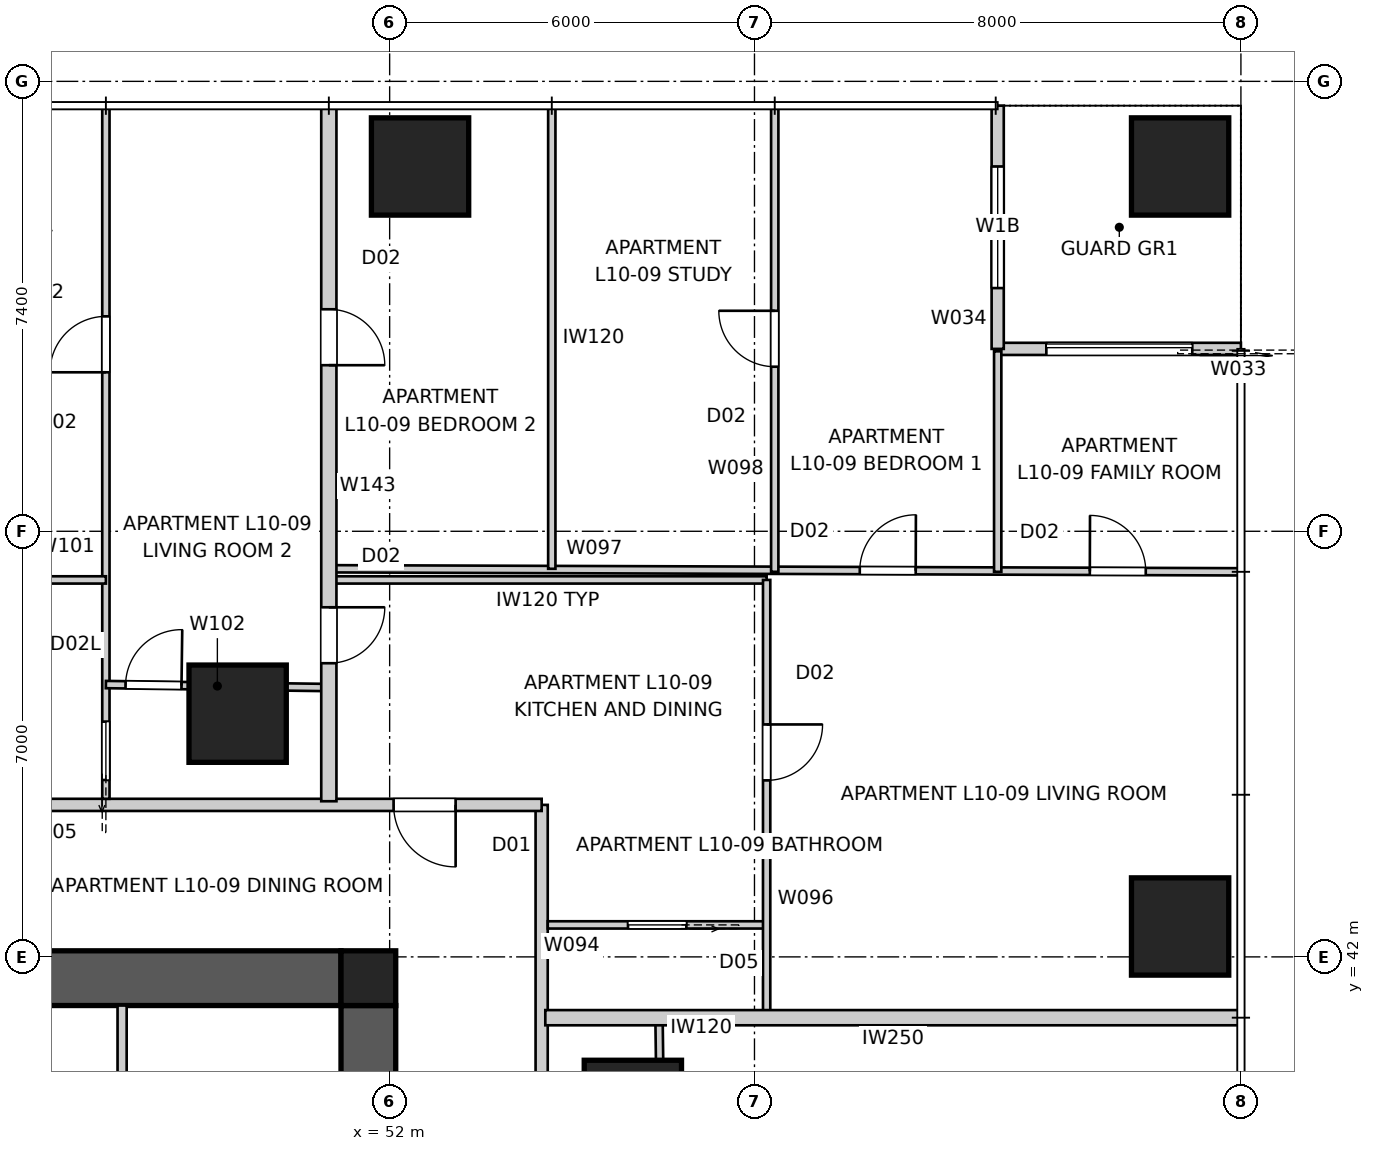
"""IFC4 building model, lengths in metres.
Left out: names, types, materials, properties, quantities, classifications, styles, units other than length and angle.
Written with IfcOpenShell. Run it as: python <this file> out.ifc"""

import sys

from ifc_helpers import new_model, si_unit, direction, frame, frame_2d, origin, origin_2d, place, context, subcontext, project, spatial, polyline, rectangle, outline, extrude, element, fill, save


model = new_model("IFC4")
c1 = context("Model", 3, precision=1e-05, world=origin(), true_north=direction((0.0, 1.0)))
c2 = subcontext(c1, "Body", "Model", "MODEL_VIEW")
j1 = project(units=[si_unit("LENGTHUNIT", "METRE"), si_unit("PLANEANGLEUNIT", "RADIAN")], contexts=[c1])
p1 = place(None, origin())
s1 = spatial("IfcSite", under=j1, at=p1, CompositionType="ELEMENT")
p2 = place(p1, origin())
s2 = spatial("IfcBuilding", under=s1, at=p2, CompositionType="ELEMENT")
p3 = place(p2, frame((0.0, 0.0, 38.8)))
s3 = spatial("IfcBuildingStorey", under=s2, at=p3, CompositionType="ELEMENT", Elevation=38.8)
p4 = place(p3, frame((28.8, 41.65, 0.0), z_axis=(0.0, 0.0, 1.0), x_axis=(1.0, 0.0, 0.0)))
e1 = element("IfcWall", 1, at=p4, inside=s3, PredefinedType="SHEAR", context=c2, shape_type="SweptSolid", body=[
    extrude(outline(polyline([(0.0, -0.45), (22.4, -0.45), (22.4, -0.025), (22.85, -0.025), (22.85, 0.025), (22.4, 0.025), (22.4, 0.45), (0.0, 0.45), (0.0, 0.025), (-0.45, 0.025), (-0.45, -0.025), (0.0, -0.025), (0.0, -0.45)])), origin(), (0.0, 0.0, 1.0), 3.4),
])
p5 = place(p3, frame((51.65, 18.8, 0.0), z_axis=(0.0, 0.0, 1.0), x_axis=(0.0, 1.0, 0.0)))
e2 = element("IfcWall", 2, at=p5, inside=s3, PredefinedType="SHEAR", context=c2, shape_type="SweptSolid", body=[
    extrude(outline(polyline([(0.0, -0.45), (22.4, -0.45), (22.4, -0.025), (22.85, -0.025), (22.85, 0.025), (22.4, 0.025), (22.4, 0.45), (0.0, 0.45), (0.0, 0.025), (-0.45, 0.025), (-0.45, -0.025), (0.0, -0.025), (0.0, -0.45)])), origin(), (0.0, 0.0, 1.0), 3.4),
])
p6 = place(p5, frame((11.14, 0.0, 0.0)))
e3 = element("IfcOpeningElement", 3, at=p6, cuts=e2, PredefinedType="OPENING", context=c2, shape_type="SweptSolid", body=[
    extrude(rectangle(XDim=1.02, YDim=2.4, at=frame_2d((0.51, 1.2))), frame((0.0, 0.46, 0.0), z_axis=(0.0, -1.0, 0.0), x_axis=(1.0, 0.0, 0.0)), (0.0, 0.0, 1.0), 0.92),
])
p7 = place(p3, frame((51.65, 41.65, 0.0), z_axis=(0.0, 0.0, 1.0), x_axis=(1.0, 0.0, 0.0)))
e4 = element("IfcColumn", 4, at=p7, inside=s3, PredefinedType="COLUMN", context=c2, shape_type="SweptSolid", body=[
    extrude(rectangle(XDim=0.9, YDim=0.9, at=origin_2d()), origin(), (0.0, 0.0, 1.0), 3.4),
])
for number, where, z_axis, x_axis in (
    (5, (65.0, 42.5, 0.0), (0.0, 0.0, 1.0), (1.0, 0.0, 0.0)),
    (6, (65.0, 55.0, 0.0), (0.0, 0.0, 1.0), (1.0, 0.0, 0.0)),
    (7, (52.5, 55.0, 0.0), (0.0, 0.0, 1.0), (1.0, 0.0, 0.0)),
):
    element("IfcColumn", number, at=place(p3, frame(where, z_axis=z_axis, x_axis=x_axis)), inside=s3, PredefinedType="COLUMN", context=c2, shape_type="SweptSolid", body=[
        extrude(rectangle(XDim=1.6, YDim=1.6, at=origin_2d()), origin(), (0.0, 0.0, 1.0), 3.2),
    ])
for number, where, z_axis, x_axis in (
    (8, (56.0, 39.5, 0.0), (0.0, 0.0, 1.0), (1.0, 0.0, 0.0)),
    (9, (49.5, 46.0, 0.0), (0.0, 0.0, 1.0), (1.0, 0.0, 0.0)),
):
    element("IfcColumn", number, at=place(p3, frame(where, z_axis=z_axis, x_axis=x_axis)), inside=s3, PredefinedType="COLUMN", context=c2, shape_type="SweptSolid", body=[
        extrude(rectangle(XDim=1.6, YDim=1.6, at=origin_2d()), origin(), (0.0, 0.0, 1.0), 3.4),
    ])
p8 = place(p3, frame((66.0, 52.0, 0.0), z_axis=(0.0, 0.0, 1.0), x_axis=(-1.0, 0.0, 0.0)))
e10 = element("IfcWall", 10, at=p8, inside=s3, PredefinedType="SOLIDWALL", context=c2, shape_type="SweptSolid", body=[
    extrude(rectangle(XDim=4.0, YDim=0.2, at=frame_2d((2.0, 0.0))), origin(), (0.0, 0.0, 1.0), 3.2),
])
p9 = place(p8, frame((0.8, 0.0, 0.0)))
e11 = element("IfcOpeningElement", 11, at=p9, cuts=e10, PredefinedType="OPENING", context=c2, shape_type="SweptSolid", body=[
    extrude(rectangle(XDim=2.4, YDim=2.1, at=frame_2d((1.2, 1.05))), frame((0.0, 0.11, 0.0), z_axis=(0.0, -1.0, 0.0), x_axis=(1.0, 0.0, 0.0)), (0.0, 0.0, 1.0), 0.22),
])
p10 = place(p3, frame((62.0, 52.0, 0.0), z_axis=(0.0, 0.0, 1.0), x_axis=(0.0, 1.0, 0.0)))
e12 = element("IfcWall", 12, at=p10, inside=s3, PredefinedType="SOLIDWALL", context=c2, shape_type="SweptSolid", body=[
    extrude(rectangle(XDim=4.0, YDim=0.2, at=frame_2d((2.0, 0.0))), origin(), (0.0, 0.0, 1.0), 3.2),
])
p11 = place(p10, frame((1.0, 0.0, 0.4)))
e13 = element("IfcOpeningElement", 13, at=p11, cuts=e12, PredefinedType="OPENING", context=c2, shape_type="SweptSolid", body=[
    extrude(rectangle(XDim=2.0, YDim=1.8, at=frame_2d((1.0, 0.9))), frame((0.0, 0.11, 0.0), z_axis=(0.0, -1.0, 0.0), x_axis=(1.0, 0.0, 0.0)), (0.0, 0.0, 1.0), 0.22),
])
p12 = place(p3, frame((54.5, 16.3, 0.0), z_axis=(0.0, 0.0, 1.0), x_axis=(0.0, 1.0, 0.0)))
e14 = element("IfcWall", 14, at=p12, inside=s3, PredefinedType="PARTITIONING", context=c2, shape_type="SweptSolid", body=[
    extrude(rectangle(XDim=28.2, YDim=0.2, at=frame_2d((14.1, 0.0))), origin(), (0.0, 0.0, 1.0), 3.2),
])
p13 = place(p12, frame((7.277, 0.0, 0.0)))
e15 = element("IfcOpeningElement", 15, at=p13, cuts=e14, PredefinedType="OPENING", context=c2, shape_type="SweptSolid", body=[
    extrude(rectangle(XDim=1.02, YDim=2.34, at=frame_2d((0.51, 1.17))), frame((0.0, 0.11, 0.0), z_axis=(0.0, -1.0, 0.0), x_axis=(1.0, 0.0, 0.0)), (0.0, 0.0, 1.0), 0.22),
])
p14 = place(p12, frame((15.16, 0.0, 0.0)))
e16 = element("IfcOpeningElement", 16, at=p14, cuts=e14, PredefinedType="OPENING", context=c2, shape_type="SweptSolid", body=[
    extrude(rectangle(XDim=1.02, YDim=2.34, at=frame_2d((0.51, 1.17))), frame((0.0, 0.11, 0.0), z_axis=(0.0, -1.0, 0.0), x_axis=(1.0, 0.0, 0.0)), (0.0, 0.0, 1.0), 0.22),
])
p15 = place(p3, frame((54.5, 44.5, 0.0), z_axis=(0.0, 0.0, 1.0), x_axis=(-1.0, 0.0, 0.0)))
e17 = element("IfcWall", 17, at=p15, inside=s3, PredefinedType="PARTITIONING", context=c2, shape_type="SweptSolid", body=[
    extrude(rectangle(XDim=28.2, YDim=0.2, at=frame_2d((14.1, 0.0))), origin(), (0.0, 0.0, 1.0), 3.2),
])
p16 = place(p15, frame((19.853, 0.0, 0.0)))
e18 = element("IfcOpeningElement", 18, at=p16, cuts=e17, PredefinedType="OPENING", context=c2, shape_type="SweptSolid", body=[
    extrude(rectangle(XDim=1.02, YDim=2.34, at=frame_2d((0.51, 1.17))), frame((0.0, 0.11, 0.0), z_axis=(0.0, -1.0, 0.0), x_axis=(1.0, 0.0, 0.0)), (0.0, 0.0, 1.0), 0.22),
])
p17 = place(p15, frame((1.415, 0.0, 0.0)))
e19 = element("IfcOpeningElement", 19, at=p17, cuts=e17, PredefinedType="OPENING", context=c2, shape_type="SweptSolid", body=[
    extrude(rectangle(XDim=1.02, YDim=2.34, at=frame_2d((0.51, 1.17))), frame((0.0, 0.11, 0.0), z_axis=(0.0, -1.0, 0.0), x_axis=(1.0, 0.0, 0.0)), (0.0, 0.0, 1.0), 0.22),
])
p18 = place(p3, frame((66.0, 41.0, 0.0), z_axis=(0.0, 0.0, 1.0), x_axis=(-1.0, 0.0, 0.0)))
e20 = element("IfcWall", 20, at=p18, inside=s3, PredefinedType="PARTITIONING", context=c2, shape_type="SweptSolid", body=[
    extrude(rectangle(XDim=11.44, YDim=0.25, at=frame_2d((5.72, 0.0))), origin(), (0.0, 0.0, 1.0), 3.2),
])
p19 = place(p3, frame((51.0, 56.0, 0.0), z_axis=(0.0, 0.0, 1.0), x_axis=(0.0, -1.0, 0.0)))
e21 = element("IfcWall", 21, at=p19, inside=s3, PredefinedType="PARTITIONING", context=c2, shape_type="SweptSolid", body=[
    extrude(rectangle(XDim=11.44, YDim=0.25, at=frame_2d((5.72, 0.0))), origin(), (0.0, 0.0, 1.0), 3.2),
])
p20 = place(p19, frame((8.25, 0.0, 0.0)))
e22 = element("IfcOpeningElement", 22, at=p20, cuts=e21, PredefinedType="OPENING", context=c2, shape_type="SweptSolid", body=[
    extrude(rectangle(XDim=0.92, YDim=2.34, at=frame_2d((0.46, 1.17))), frame((0.0, 0.135, 0.0), z_axis=(0.0, -1.0, 0.0), x_axis=(1.0, 0.0, 0.0)), (0.0, 0.0, 1.0), 0.27),
])
p21 = place(p19, frame((3.348, 0.0, 0.0)))
e23 = element("IfcOpeningElement", 23, at=p21, cuts=e21, PredefinedType="OPENING", context=c2, shape_type="SweptSolid", body=[
    extrude(rectangle(XDim=0.92, YDim=2.34, at=frame_2d((0.46, 1.17))), frame((0.0, 0.135, 0.0), z_axis=(0.0, -1.0, 0.0), x_axis=(1.0, 0.0, 0.0)), (0.0, 0.0, 1.0), 0.27),
])
p22 = place(p3, frame((47.6, 41.2, 0.0), z_axis=(0.0, 0.0, 1.0), x_axis=(0.0, -1.0, 0.0)))
e24 = element("IfcWall", 24, at=p22, inside=s3, PredefinedType="SOLIDWALL", context=c2, shape_type="SweptSolid", body=[
    extrude(rectangle(XDim=5.9, YDim=0.15, at=frame_2d((2.95, 0.0))), origin(), (0.0, 0.0, 1.0), 3.2),
])
p23 = place(p3, frame((56.43, 41.0, 0.0), z_axis=(0.0, 0.0, 1.0), x_axis=(0.013381849808, -0.999910459039, 0.0)))
e25 = element("IfcWall", 25, at=p23, inside=s3, PredefinedType="PARTITIONING", context=c2, shape_type="SweptSolid", body=[
    extrude(rectangle(XDim=3.667, YDim=0.12, at=frame_2d((1.833, 0.0))), origin(), (0.0, 0.0, 1.0), 2.2),
])
p24 = place(p3, frame((58.2, 42.526, 0.0), z_axis=(0.0, 0.0, 1.0), x_axis=(-1.0, 0.0, 0.0)))
e26 = element("IfcWall", 26, at=p24, inside=s3, PredefinedType="PARTITIONING", context=c2, shape_type="SweptSolid", body=[
    extrude(rectangle(XDim=3.6, YDim=0.12, at=frame_2d((1.8, 0.0))), origin(), (0.0, 0.0, 1.0), 3.2),
])
p25 = place(p24, frame((1.32, 0.0, 0.0)))
e27 = element("IfcOpeningElement", 27, at=p25, cuts=e26, PredefinedType="OPENING", context=c2, shape_type="SweptSolid", body=[
    extrude(rectangle(XDim=0.96, YDim=2.1, at=frame_2d((0.48, 1.05))), frame((0.0, 0.07, 0.0), z_axis=(0.0, -1.0, 0.0), x_axis=(1.0, 0.0, 0.0)), (0.0, 0.0, 1.0), 0.14),
])
p26 = place(p3, frame((51.0, 48.2, 0.0), z_axis=(0.0, 0.0, 1.0), x_axis=(1.0, 0.0, 0.0)))
e28 = element("IfcWall", 28, at=p26, inside=s3, PredefinedType="PARTITIONING", context=c2, shape_type="SweptSolid", body=[
    extrude(rectangle(XDim=7.2, YDim=0.12, at=frame_2d((3.6, 0.0))), origin(), (0.0, 0.0, 1.0), 3.2),
])
p27 = place(p3, frame((58.2, 48.2, 0.0), z_axis=(0.0, 0.0, 1.0), x_axis=(0.0, -1.0, 0.0)))
e29 = element("IfcWall", 29, at=p27, inside=s3, PredefinedType="PARTITIONING", context=c2, shape_type="SweptSolid", body=[
    extrude(rectangle(XDim=7.2, YDim=0.12, at=frame_2d((3.6, 0.0))), origin(), (0.0, 0.0, 1.0), 3.2),
])
p28 = place(p27, frame((2.377, 0.0, 0.0)))
e30 = element("IfcOpeningElement", 30, at=p28, cuts=e29, PredefinedType="OPENING", context=c2, shape_type="SweptSolid", body=[
    extrude(rectangle(XDim=0.92, YDim=2.34, at=frame_2d((0.46, 1.17))), frame((0.0, 0.07, 0.0), z_axis=(0.0, -1.0, 0.0), x_axis=(1.0, 0.0, 0.0)), (0.0, 0.0, 1.0), 0.14),
])
p29 = place(p3, frame((51.0, 48.383, 0.0), z_axis=(0.0, 0.0, 1.0), x_axis=(0.9999944038, -0.003345499915, 0.0)))
e31 = element("IfcWall", 31, at=p29, inside=s3, PredefinedType="PARTITIONING", context=c2, shape_type="SweptSolid", body=[
    extrude(rectangle(XDim=14.96, YDim=0.12, at=frame_2d((7.48, 0.0))), origin(), (0.0, 0.0, 1.0), 3.2),
])
p30 = place(p29, frame((12.515, 0.0, 0.0)))
e32 = element("IfcOpeningElement", 32, at=p30, cuts=e31, PredefinedType="OPENING", context=c2, shape_type="SweptSolid", body=[
    extrude(rectangle(XDim=0.92, YDim=2.34, at=frame_2d((0.46, 1.17))), frame((0.0, 0.07, 0.0), z_axis=(0.0, -1.0, 0.0), x_axis=(1.0, 0.0, 0.0)), (0.0, 0.0, 1.0), 0.14),
])
p31 = place(p29, frame((8.732, 0.0, 0.0)))
e33 = element("IfcOpeningElement", 33, at=p31, cuts=e31, PredefinedType="OPENING", context=c2, shape_type="SweptSolid", body=[
    extrude(rectangle(XDim=0.92, YDim=2.34, at=frame_2d((0.46, 1.17))), frame((0.0, 0.07, 0.0), z_axis=(0.0, -1.0, 0.0), x_axis=(1.0, 0.0, 0.0)), (0.0, 0.0, 1.0), 0.14),
])
p32 = place(p3, frame((58.333, 48.333, 0.0), z_axis=(0.0, 0.0, 1.0), x_axis=(0.0, 1.0, 0.0)))
e34 = element("IfcWall", 34, at=p32, inside=s3, PredefinedType="PARTITIONING", context=c2, shape_type="SweptSolid", body=[
    extrude(rectangle(XDim=7.627, YDim=0.12, at=frame_2d((3.813, 0.0))), origin(), (0.0, 0.0, 1.0), 3.2),
])
p33 = place(p32, frame((3.373, 0.0, 0.0)))
e35 = element("IfcOpeningElement", 35, at=p33, cuts=e34, PredefinedType="OPENING", context=c2, shape_type="SweptSolid", body=[
    extrude(rectangle(XDim=0.92, YDim=2.34, at=frame_2d((0.46, 1.17))), frame((0.0, 0.07, 0.0), z_axis=(0.0, -1.0, 0.0), x_axis=(1.0, 0.0, 0.0)), (0.0, 0.0, 1.0), 0.14),
])
p34 = place(p3, frame((62.0, 51.96, 0.0), z_axis=(0.0, 0.0, 1.0), x_axis=(0.0, -1.0, 0.0)))
e36 = element("IfcWall", 36, at=p34, inside=s3, PredefinedType="PARTITIONING", context=c2, shape_type="SweptSolid", body=[
    extrude(rectangle(XDim=3.627, YDim=0.12, at=frame_2d((1.813, 0.0))), origin(), (0.0, 0.0, 1.0), 3.2),
])
p35 = place(p3, frame((54.667, 55.96, 0.0), z_axis=(0.0, 0.0, 1.0), x_axis=(0.0, -1.0, 0.0)))
e37 = element("IfcWall", 37, at=p35, inside=s3, PredefinedType="PARTITIONING", context=c2, shape_type="SweptSolid", body=[
    extrude(rectangle(XDim=7.577, YDim=0.12, at=frame_2d((3.788, 0.0))), origin(), (0.0, 0.0, 1.0), 2.4),
])
p36 = place(p3, frame((47.333, 44.6, 0.0), z_axis=(0.0, 0.0, 1.0), x_axis=(0.0, 1.0, 0.0)))
e38 = element("IfcWall", 38, at=p36, inside=s3, PredefinedType="PARTITIONING", context=c2, shape_type="SweptSolid", body=[
    extrude(rectangle(XDim=11.36, YDim=0.12, at=frame_2d((5.68, 0.0))), origin(), (0.0, 0.0, 1.0), 3.2),
])
p37 = place(p36, frame((7.015, 0.0, 0.0)))
e39 = element("IfcOpeningElement", 39, at=p37, cuts=e38, PredefinedType="OPENING", context=c2, shape_type="SweptSolid", body=[
    extrude(rectangle(XDim=0.92, YDim=2.34, at=frame_2d((0.46, 1.17))), frame((0.0, 0.07, 0.0), z_axis=(0.0, -1.0, 0.0), x_axis=(1.0, 0.0, 0.0)), (0.0, 0.0, 1.0), 0.14),
])
p38 = place(p36, frame((0.31, 0.0, 0.0)))
e40 = element("IfcOpeningElement", 40, at=p38, cuts=e38, PredefinedType="OPENING", context=c2, shape_type="SweptSolid", body=[
    extrude(rectangle(XDim=0.96, YDim=2.1, at=frame_2d((0.48, 1.05))), frame((0.0, 0.07, 0.0), z_axis=(0.0, -1.0, 0.0), x_axis=(1.0, 0.0, 0.0)), (0.0, 0.0, 1.0), 0.14),
])
p39 = place(p3, frame((47.333, 46.479, 0.0), z_axis=(0.0, 0.0, 1.0), x_axis=(0.999910459039, -0.013381849808, 0.0)))
e41 = element("IfcWall", 41, at=p39, inside=s3, PredefinedType="PARTITIONING", context=c2, shape_type="SweptSolid", body=[
    extrude(rectangle(XDim=3.667, YDim=0.12, at=frame_2d((1.833, 0.0))), origin(), (0.0, 0.0, 1.0), 2.2),
])
p40 = place(p39, frame((0.323, 0.0, 0.0)))
e42 = element("IfcOpeningElement", 42, at=p40, cuts=e41, PredefinedType="OPENING", context=c2, shape_type="SweptSolid", body=[
    extrude(rectangle(XDim=0.92, YDim=2.1, at=frame_2d((0.46, 1.05))), frame((0.0, 0.07, 0.0), z_axis=(0.0, -1.0, 0.0), x_axis=(1.0, 0.0, 0.0)), (0.0, 0.0, 1.0), 0.14),
])
p41 = place(p3, frame((37.708, 48.2, 0.0), z_axis=(0.0, 0.0, 1.0), x_axis=(1.0, 0.0, 0.0)))
e43 = element("IfcWall", 43, at=p41, inside=s3, PredefinedType="PARTITIONING", context=c2, shape_type="SweptSolid", body=[
    extrude(rectangle(XDim=9.625, YDim=0.12, at=frame_2d((4.812, 0.0))), origin(), (0.0, 0.0, 1.0), 3.2),
])
p42 = place(p41, frame((0.666, 0.0, 0.0)))
e44 = element("IfcOpeningElement", 44, at=p42, cuts=e43, PredefinedType="OPENING", context=c2, shape_type="SweptSolid", body=[
    extrude(rectangle(XDim=0.96, YDim=2.1, at=frame_2d((0.48, 1.05))), frame((0.0, 0.07, 0.0), z_axis=(0.0, -1.0, 0.0), x_axis=(1.0, 0.0, 0.0)), (0.0, 0.0, 1.0), 0.14),
])
p43 = place(p41, frame((3.67, 0.0, 0.0)))
e45 = element("IfcOpeningElement", 45, at=p43, cuts=e43, PredefinedType="OPENING", context=c2, shape_type="SweptSolid", body=[
    extrude(rectangle(XDim=0.96, YDim=2.1, at=frame_2d((0.48, 1.05))), frame((0.0, 0.07, 0.0), z_axis=(0.0, -1.0, 0.0), x_axis=(1.0, 0.0, 0.0)), (0.0, 0.0, 1.0), 0.14),
])
p44 = place(p9, origin())
e46 = element("IfcDoor", 46, at=p44, inside=s3, OperationType="SLIDING_TO_LEFT", PredefinedType="DOOR", context=c2, shape_type="SweptSolid", body=[
    extrude(rectangle(XDim=2.4, YDim=2.1, at=frame_2d((1.2, 1.05))), frame((0.0, 0.025, 0.0), z_axis=(0.0, -1.0, 0.0), x_axis=(1.0, 0.0, 0.0)), (0.0, 0.0, 1.0), 0.05),
])
fill(e11, e46)
p45 = place(p11, origin())
e47 = element("IfcWindow", 47, at=p45, inside=s3, PartitioningType="SINGLE_PANEL", PredefinedType="WINDOW", context=c2, shape_type="SweptSolid", body=[
    extrude(rectangle(XDim=2.0, YDim=1.8, at=frame_2d((1.0, 0.9))), frame((0.0, 0.03, 0.0), z_axis=(0.0, -1.0, 0.0), x_axis=(1.0, 0.0, 0.0)), (0.0, 0.0, 1.0), 0.06),
])
fill(e13, e47)
p46 = place(p17, origin())
e48 = element("IfcDoor", 48, at=p46, inside=s3, OperationType="SINGLE_SWING_LEFT", PredefinedType="DOOR", context=c2, shape_type="SweptSolid", body=[
    extrude(rectangle(XDim=1.02, YDim=2.34, at=frame_2d((0.51, 1.17))), frame((0.0, 0.025, 0.0), z_axis=(0.0, -1.0, 0.0), x_axis=(1.0, 0.0, 0.0)), (0.0, 0.0, 1.0), 0.05),
])
fill(e19, e48)
p47 = place(p28, origin())
e49 = element("IfcDoor", 49, at=p47, inside=s3, OperationType="SINGLE_SWING_LEFT", PredefinedType="DOOR", context=c2, shape_type="SweptSolid", body=[
    extrude(rectangle(XDim=0.92, YDim=2.34, at=frame_2d((0.46, 1.17))), frame((0.0, 0.025, 0.0), z_axis=(0.0, -1.0, 0.0), x_axis=(1.0, 0.0, 0.0)), (0.0, 0.0, 1.0), 0.05),
])
fill(e30, e49)
p48 = place(p25, origin())
e50 = element("IfcDoor", 50, at=p48, inside=s3, OperationType="SLIDING_TO_LEFT", PredefinedType="DOOR", context=c2, shape_type="SweptSolid", body=[
    extrude(rectangle(XDim=0.96, YDim=2.1, at=frame_2d((0.48, 1.05))), frame((0.0, 0.025, 0.0), z_axis=(0.0, -1.0, 0.0), x_axis=(1.0, 0.0, 0.0)), (0.0, 0.0, 1.0), 0.05),
])
fill(e27, e50)
p49 = place(p20, origin())
e51 = element("IfcDoor", 51, at=p49, inside=s3, OperationType="SINGLE_SWING_LEFT", PredefinedType="DOOR", context=c2, shape_type="SweptSolid", body=[
    extrude(rectangle(XDim=0.92, YDim=2.34, at=frame_2d((0.46, 1.17))), frame((0.0, 0.025, 0.0), z_axis=(0.0, -1.0, 0.0), x_axis=(1.0, 0.0, 0.0)), (0.0, 0.0, 1.0), 0.05),
])
fill(e22, e51)
p50 = place(p30, origin())
e52 = element("IfcDoor", 52, at=p50, inside=s3, OperationType="SINGLE_SWING_LEFT", PredefinedType="DOOR", context=c2, shape_type="SweptSolid", body=[
    extrude(rectangle(XDim=0.92, YDim=2.34, at=frame_2d((0.46, 1.17))), frame((0.0, 0.025, 0.0), z_axis=(0.0, -1.0, 0.0), x_axis=(1.0, 0.0, 0.0)), (0.0, 0.0, 1.0), 0.05),
])
fill(e32, e52)
p51 = place(p31, origin())
e53 = element("IfcDoor", 53, at=p51, inside=s3, OperationType="SINGLE_SWING_RIGHT", PredefinedType="DOOR", context=c2, shape_type="SweptSolid", body=[
    extrude(rectangle(XDim=0.92, YDim=2.34, at=frame_2d((0.46, 1.17))), frame((0.0, 0.025, 0.0), z_axis=(0.0, -1.0, 0.0), x_axis=(1.0, 0.0, 0.0)), (0.0, 0.0, 1.0), 0.05),
])
fill(e33, e53)
p52 = place(p37, origin())
e54 = element("IfcDoor", 54, at=p52, inside=s3, OperationType="SINGLE_SWING_LEFT", PredefinedType="DOOR", context=c2, shape_type="SweptSolid", body=[
    extrude(rectangle(XDim=0.92, YDim=2.34, at=frame_2d((0.46, 1.17))), frame((0.0, 0.025, 0.0), z_axis=(0.0, -1.0, 0.0), x_axis=(1.0, 0.0, 0.0)), (0.0, 0.0, 1.0), 0.05),
])
fill(e39, e54)
p53 = place(p21, origin())
e55 = element("IfcDoor", 55, at=p53, inside=s3, OperationType="SINGLE_SWING_RIGHT", PredefinedType="DOOR", context=c2, shape_type="SweptSolid", body=[
    extrude(rectangle(XDim=0.92, YDim=2.34, at=frame_2d((0.46, 1.17))), frame((0.0, 0.025, 0.0), z_axis=(0.0, -1.0, 0.0), x_axis=(1.0, 0.0, 0.0)), (0.0, 0.0, 1.0), 0.05),
])
fill(e23, e55)
p54 = place(p40, origin())
e56 = element("IfcDoor", 56, at=p54, inside=s3, OperationType="SINGLE_SWING_RIGHT", PredefinedType="DOOR", context=c2, shape_type="SweptSolid", body=[
    extrude(rectangle(XDim=0.92, YDim=2.1, at=frame_2d((0.46, 1.05))), frame((0.0, 0.025, 0.0), z_axis=(0.0, -1.0, 0.0), x_axis=(1.0, 0.0, 0.0)), (0.0, 0.0, 1.0), 0.05),
])
fill(e42, e56)
p55 = place(p38, origin())
e57 = element("IfcDoor", 57, at=p55, inside=s3, OperationType="SLIDING_TO_LEFT", PredefinedType="DOOR", context=c2, shape_type="SweptSolid", body=[
    extrude(rectangle(XDim=0.96, YDim=2.1, at=frame_2d((0.48, 1.05))), frame((0.0, 0.025, 0.0), z_axis=(0.0, -1.0, 0.0), x_axis=(1.0, 0.0, 0.0)), (0.0, 0.0, 1.0), 0.05),
])
fill(e40, e57)
p56 = place(p33, origin())
e58 = element("IfcDoor", 58, at=p56, inside=s3, OperationType="SINGLE_SWING_RIGHT", PredefinedType="DOOR", context=c2, shape_type="SweptSolid", body=[
    extrude(rectangle(XDim=0.92, YDim=2.34, at=frame_2d((0.46, 1.17))), frame((0.0, 0.025, 0.0), z_axis=(0.0, -1.0, 0.0), x_axis=(1.0, 0.0, 0.0)), (0.0, 0.0, 1.0), 0.05),
])
fill(e35, e58)
save(model, sys.argv[1])
